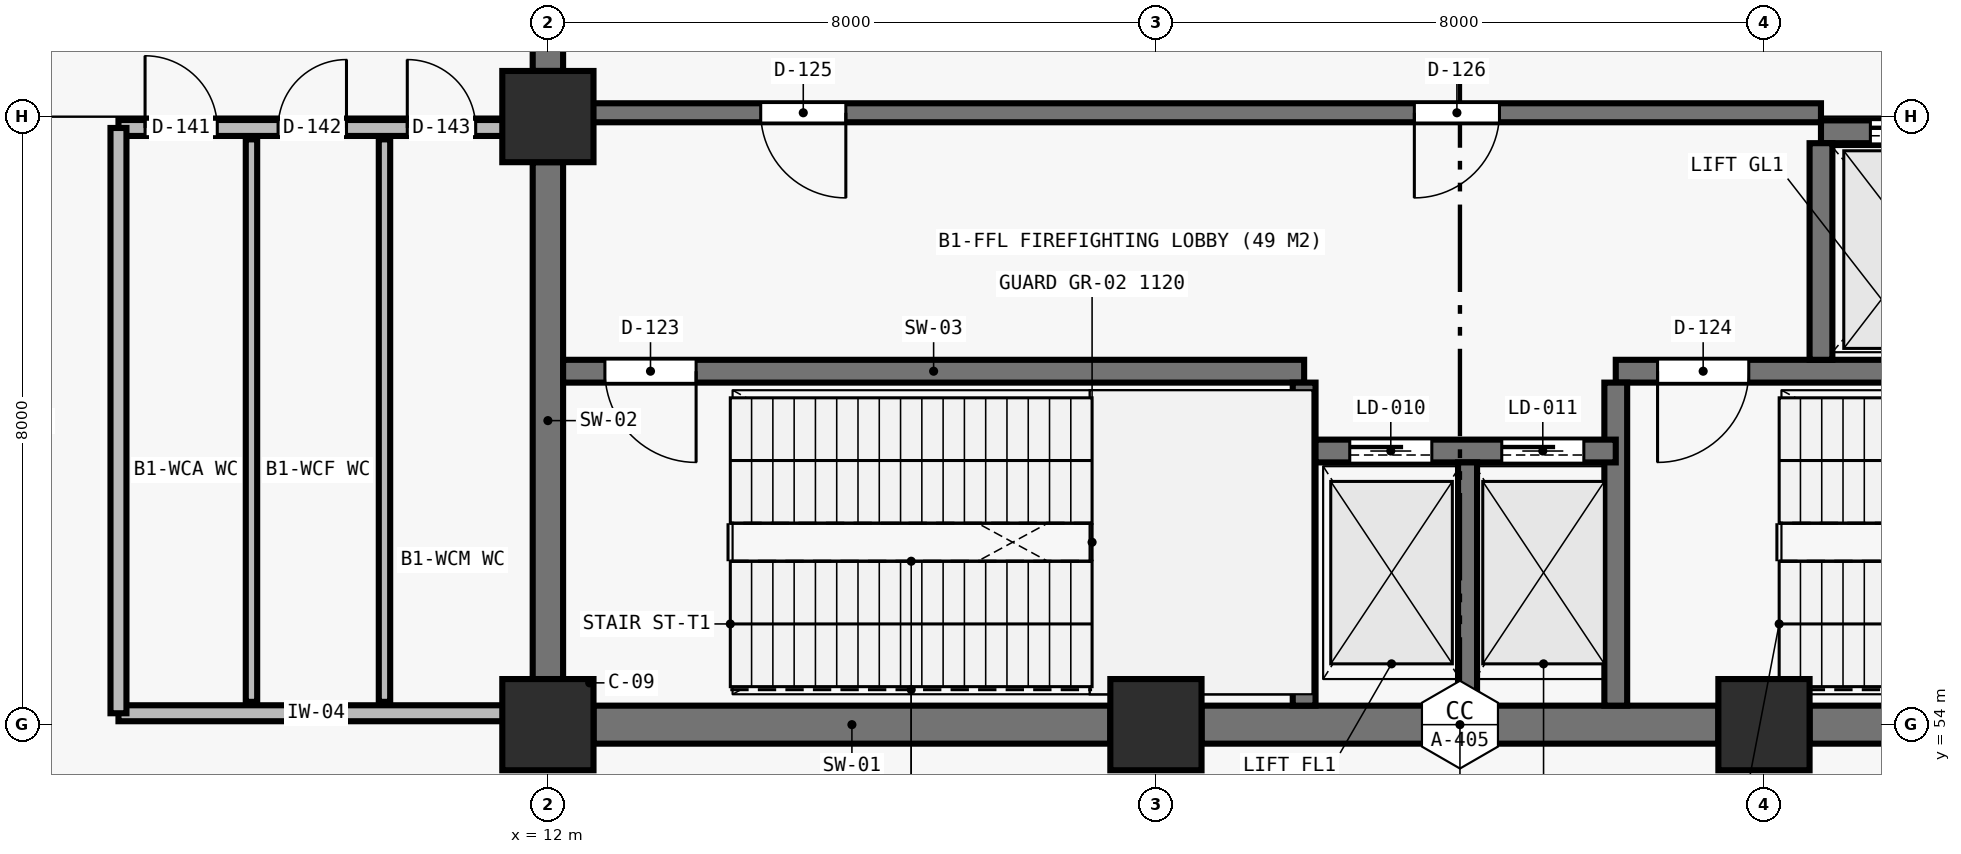
"""IFC4 building model, lengths in metres.
Left out: names, types, materials, properties, quantities, classifications, styles, units other than length and angle.
Written with IfcOpenShell. Run it as: python <this file> out.ifc"""

import sys

from ifc_helpers import new_model, si_unit, direction, frame, frame_2d, origin, origin_2d, place, context, subcontext, project, spatial, rectangle, extrude, element, fill, save


model = new_model("IFC4")
c1 = context("Model", 3, precision=1e-05, world=origin(), true_north=direction((0.0, 1.0)))
c2 = subcontext(c1, "Body", "Model", "MODEL_VIEW")
j1 = project(units=[si_unit("LENGTHUNIT", "METRE"), si_unit("PLANEANGLEUNIT", "RADIAN")], contexts=[c1])
p1 = place(None, origin())
s1 = spatial("IfcSite", under=j1, at=p1, CompositionType="ELEMENT")
p2 = place(p1, origin())
s2 = spatial("IfcBuilding", under=s1, at=p2, CompositionType="ELEMENT")
p3 = place(p2, frame((0.0, 0.0, -6.3)))
s3 = spatial("IfcBuildingStorey", under=s2, at=p3, CompositionType="ELEMENT", Elevation=-6.3)
for number, where, z_axis, x_axis in (
    (1, (12.0, 54.0, 0.0), (0.0, 0.0, 1.0), (1.0, 0.0, 0.0)),
    (2, (12.0, 62.0, 0.0), (0.0, 0.0, 1.0), (1.0, 0.0, 0.0)),
    (3, (20.0, 54.0, 0.0), (0.0, 0.0, 1.0), (1.0, 0.0, 0.0)),
    (4, (28.0, 54.0, 0.0), (0.0, 0.0, 1.0), (1.0, 0.0, 0.0)),
):
    element("IfcColumn", number, at=place(p3, frame(where, z_axis=z_axis, x_axis=x_axis)), inside=s3, PredefinedType="COLUMN", context=c2, shape_type="SweptSolid", body=[
        extrude(rectangle(XDim=1.2, YDim=1.2, at=origin_2d()), origin(), (0.0, 0.0, 1.0), 5.85),
    ])
for number, where, z_axis, x_axis in (
    (5, (12.6, 54.0, 0.0), (0.0, 0.0, 1.0), (1.0, 0.0, 0.0)),
    (6, (20.6, 54.0, 0.0), (0.0, 0.0, 1.0), (1.0, 0.0, 0.0)),
    (7, (28.6, 54.0, 0.0), (0.0, 0.0, 1.0), (1.0, 0.0, 0.0)),
):
    element("IfcWall", number, at=place(p3, frame(where, z_axis=z_axis, x_axis=x_axis)), inside=s3, PredefinedType="SHEAR", context=c2, shape_type="SweptSolid", body=[
        extrude(rectangle(XDim=6.8, YDim=0.5, at=frame_2d((3.4, 0.0))), origin(), (0.0, 0.0, 1.0), 5.85),
    ])
p4 = place(p3, frame((12.0, 54.6, 0.0), z_axis=(0.0, 0.0, 1.0), x_axis=(0.0, 1.0, 0.0)))
e8 = element("IfcWall", 8, at=p4, inside=s3, PredefinedType="SHEAR", context=c2, shape_type="SweptSolid", body=[
    extrude(rectangle(XDim=6.8, YDim=0.4, at=frame_2d((3.4, 0.0))), origin(), (0.0, 0.0, 1.0), 5.85),
])
p5 = place(p3, frame((12.0, 62.6, 0.0), z_axis=(0.0, 0.0, 1.0), x_axis=(0.0, 1.0, 0.0)))
e9 = element("IfcWall", 9, at=p5, inside=s3, PredefinedType="SHEAR", context=c2, shape_type="SweptSolid", body=[
    extrude(rectangle(XDim=6.8, YDim=0.4, at=frame_2d((3.4, 0.0))), origin(), (0.0, 0.0, 1.0), 5.85),
])
p6 = place(p5, frame((0.3, 0.0, 0.0)))
e10 = element("IfcOpeningElement", 10, at=p6, cuts=e9, PredefinedType="OPENING", context=c2, shape_type="SweptSolid", body=[
    extrude(rectangle(XDim=1.8, YDim=2.2, at=frame_2d((0.9, 1.1))), frame((0.0, 0.21, 0.0), z_axis=(0.0, -1.0, 0.0), x_axis=(1.0, 0.0, 0.0)), (0.0, 0.0, 1.0), 0.42),
])
p7 = place(p3, frame((12.2, 58.65, 0.0), z_axis=(0.0, 0.0, 1.0), x_axis=(1.0, 0.0, 0.0)))
e11 = element("IfcWall", 11, at=p7, inside=s3, PredefinedType="SHEAR", context=c2, shape_type="SweptSolid", body=[
    extrude(rectangle(XDim=9.75, YDim=0.3, at=frame_2d((4.875, 0.0))), origin(), (0.0, 0.0, 1.0), 5.85),
])
p8 = place(p7, frame((0.55, 0.0, 0.0)))
e12 = element("IfcOpeningElement", 12, at=p8, cuts=e11, PredefinedType="OPENING", context=c2, shape_type="SweptSolid", body=[
    extrude(rectangle(XDim=1.2, YDim=2.2, at=frame_2d((0.6, 1.1))), frame((0.0, 0.16, 0.0), z_axis=(0.0, -1.0, 0.0), x_axis=(1.0, 0.0, 0.0)), (0.0, 0.0, 1.0), 0.32),
])
p9 = place(p3, frame((21.95, 54.25, 0.0), z_axis=(0.0, 0.0, 1.0), x_axis=(0.0, 1.0, 0.0)))
e13 = element("IfcWall", 13, at=p9, inside=s3, PredefinedType="SHEAR", context=c2, shape_type="SweptSolid", body=[
    extrude(rectangle(XDim=4.25, YDim=0.3, at=frame_2d((2.125, 0.0))), origin(), (0.0, 0.0, 1.0), 5.85),
])
p10 = place(p3, frame((26.05, 58.65, 0.0), z_axis=(0.0, 0.0, 1.0), x_axis=(1.0, 0.0, 0.0)))
e14 = element("IfcWall", 14, at=p10, inside=s3, PredefinedType="SHEAR", context=c2, shape_type="SweptSolid", body=[
    extrude(rectangle(XDim=9.75, YDim=0.3, at=frame_2d((4.875, 0.0))), origin(), (0.0, 0.0, 1.0), 5.85),
])
p11 = place(p10, frame((0.55, 0.0, 0.0)))
e15 = element("IfcOpeningElement", 15, at=p11, cuts=e14, PredefinedType="OPENING", context=c2, shape_type="SweptSolid", body=[
    extrude(rectangle(XDim=1.2, YDim=2.2, at=frame_2d((0.6, 1.1))), frame((0.0, 0.16, 0.0), z_axis=(0.0, -1.0, 0.0), x_axis=(1.0, 0.0, 0.0)), (0.0, 0.0, 1.0), 0.32),
])
p12 = place(p3, frame((26.05, 54.25, 0.0), z_axis=(0.0, 0.0, 1.0), x_axis=(0.0, 1.0, 0.0)))
e16 = element("IfcWall", 16, at=p12, inside=s3, PredefinedType="SHEAR", context=c2, shape_type="SweptSolid", body=[
    extrude(rectangle(XDim=4.25, YDim=0.3, at=frame_2d((2.125, 0.0))), origin(), (0.0, 0.0, 1.0), 5.85),
])
p13 = place(p3, frame((22.1, 57.6, 0.0), z_axis=(0.0, 0.0, 1.0), x_axis=(1.0, 0.0, 0.0)))
e17 = element("IfcWall", 17, at=p13, inside=s3, PredefinedType="SHEAR", context=c2, shape_type="SweptSolid", body=[
    extrude(rectangle(XDim=3.95, YDim=0.3, at=frame_2d((1.975, 0.0))), origin(), (0.0, 0.0, 1.0), 5.85),
])
p14 = place(p13, frame((0.45, 0.0, 0.0)))
e18 = element("IfcOpeningElement", 18, at=p14, cuts=e17, PredefinedType="OPENING", context=c2, shape_type="SweptSolid", body=[
    extrude(rectangle(XDim=1.08, YDim=2.2, at=frame_2d((0.54, 1.1))), frame((0.0, 0.16, 0.0), z_axis=(0.0, -1.0, 0.0), x_axis=(1.0, 0.0, 0.0)), (0.0, 0.0, 1.0), 0.32),
])
p15 = place(p13, frame((2.45, 0.0, 0.0)))
e19 = element("IfcOpeningElement", 19, at=p15, cuts=e17, PredefinedType="OPENING", context=c2, shape_type="SweptSolid", body=[
    extrude(rectangle(XDim=1.08, YDim=2.2, at=frame_2d((0.54, 1.1))), frame((0.0, 0.16, 0.0), z_axis=(0.0, -1.0, 0.0), x_axis=(1.0, 0.0, 0.0)), (0.0, 0.0, 1.0), 0.32),
])
p16 = place(p3, frame((24.1, 54.25, 0.0), z_axis=(0.0, 0.0, 1.0), x_axis=(0.0, 1.0, 0.0)))
e20 = element("IfcWall", 20, at=p16, inside=s3, PredefinedType="SHEAR", context=c2, shape_type="SweptSolid", body=[
    extrude(rectangle(XDim=3.2, YDim=0.25, at=frame_2d((1.6, 0.0))), origin(), (0.0, 0.0, 1.0), 5.85),
])
p17 = place(p3, frame((28.75, 61.8, 0.0), z_axis=(0.0, 0.0, 1.0), x_axis=(1.0, 0.0, 0.0)))
e21 = element("IfcWall", 21, at=p17, inside=s3, PredefinedType="SHEAR", context=c2, shape_type="SweptSolid", body=[
    extrude(rectangle(XDim=5.0, YDim=0.3, at=frame_2d((2.5, 0.0))), origin(), (0.0, 0.0, 1.0), 5.85),
])
p18 = place(p17, frame((0.65, 0.0, 0.0)))
e22 = element("IfcOpeningElement", 22, at=p18, cuts=e21, PredefinedType="OPENING", context=c2, shape_type="SweptSolid", body=[
    extrude(rectangle(XDim=1.3, YDim=2.3, at=frame_2d((0.65, 1.15))), frame((0.0, 0.16, 0.0), z_axis=(0.0, -1.0, 0.0), x_axis=(1.0, 0.0, 0.0)), (0.0, 0.0, 1.0), 0.32),
])
p19 = place(p17, frame((3.1, 0.0, 0.0)))
e23 = element("IfcOpeningElement", 23, at=p19, cuts=e21, PredefinedType="OPENING", context=c2, shape_type="SweptSolid", body=[
    extrude(rectangle(XDim=1.08, YDim=2.2, at=frame_2d((0.54, 1.1))), frame((0.0, 0.16, 0.0), z_axis=(0.0, -1.0, 0.0), x_axis=(1.0, 0.0, 0.0)), (0.0, 0.0, 1.0), 0.32),
])
p20 = place(p3, frame((28.75, 58.8, 0.0), z_axis=(0.0, 0.0, 1.0), x_axis=(0.0, 1.0, 0.0)))
e24 = element("IfcWall", 24, at=p20, inside=s3, PredefinedType="SHEAR", context=c2, shape_type="SweptSolid", body=[
    extrude(rectangle(XDim=2.85, YDim=0.3, at=frame_2d((1.425, 0.0))), origin(), (0.0, 0.0, 1.0), 5.85),
])
p21 = place(p3, frame((12.2, 62.05, 0.0), z_axis=(0.0, 0.0, 1.0), x_axis=(1.0, 0.0, 0.0)))
e25 = element("IfcWall", 25, at=p21, inside=s3, PredefinedType="SHEAR", context=c2, shape_type="SweptSolid", body=[
    extrude(rectangle(XDim=16.55, YDim=0.25, at=frame_2d((8.275, 0.0))), origin(), (0.0, 0.0, 1.0), 5.85),
])
p22 = place(p21, frame((2.6, 0.0, 0.0)))
e26 = element("IfcOpeningElement", 26, at=p22, cuts=e25, PredefinedType="OPENING", context=c2, shape_type="SweptSolid", body=[
    extrude(rectangle(XDim=1.12, YDim=2.22, at=frame_2d((0.56, 1.11))), frame((0.0, 0.135, 0.0), z_axis=(0.0, -1.0, 0.0), x_axis=(1.0, 0.0, 0.0)), (0.0, 0.0, 1.0), 0.27),
])
p23 = place(p21, frame((11.2, 0.0, 0.0)))
e27 = element("IfcOpeningElement", 27, at=p23, cuts=e25, PredefinedType="OPENING", context=c2, shape_type="SweptSolid", body=[
    extrude(rectangle(XDim=1.12, YDim=2.22, at=frame_2d((0.56, 1.11))), frame((0.0, 0.135, 0.0), z_axis=(0.0, -1.0, 0.0), x_axis=(1.0, 0.0, 0.0)), (0.0, 0.0, 1.0), 0.27),
])
p24 = place(p3, frame((6.35, 61.85, 0.0), z_axis=(0.0, 0.0, 1.0), x_axis=(1.0, 0.0, 0.0)))
e28 = element("IfcWall", 28, at=p24, inside=s3, PredefinedType="PLUMBINGWALL", context=c2, shape_type="SweptSolid", body=[
    extrude(rectangle(XDim=5.2, YDim=0.21, at=frame_2d((2.6, 0.0))), origin(), (0.0, 0.0, 1.0), 4.65),
])
p25 = place(p24, frame((0.35, 0.0, 0.0)))
e29 = element("IfcOpeningElement", 29, at=p25, cuts=e28, PredefinedType="OPENING", context=c2, shape_type="SweptSolid", body=[
    extrude(rectangle(XDim=0.95, YDim=2.1, at=frame_2d((0.475, 1.05))), frame((0.0, 0.115, 0.0), z_axis=(0.0, -1.0, 0.0), x_axis=(1.0, 0.0, 0.0)), (0.0, 0.0, 1.0), 0.23),
])
p26 = place(p24, frame((2.1, 0.0, 0.0)))
e30 = element("IfcOpeningElement", 30, at=p26, cuts=e28, PredefinedType="OPENING", context=c2, shape_type="SweptSolid", body=[
    extrude(rectangle(XDim=0.9, YDim=2.1, at=frame_2d((0.45, 1.05))), frame((0.0, 0.115, 0.0), z_axis=(0.0, -1.0, 0.0), x_axis=(1.0, 0.0, 0.0)), (0.0, 0.0, 1.0), 0.23),
])
p27 = place(p24, frame((3.8, 0.0, 0.0)))
e31 = element("IfcOpeningElement", 31, at=p27, cuts=e28, PredefinedType="OPENING", context=c2, shape_type="SweptSolid", body=[
    extrude(rectangle(XDim=0.9, YDim=2.1, at=frame_2d((0.45, 1.05))), frame((0.0, 0.115, 0.0), z_axis=(0.0, -1.0, 0.0), x_axis=(1.0, 0.0, 0.0)), (0.0, 0.0, 1.0), 0.23),
])
p28 = place(p3, frame((6.35, 54.15, 0.0), z_axis=(0.0, 0.0, 1.0), x_axis=(1.0, 0.0, 0.0)))
e32 = element("IfcWall", 32, at=p28, inside=s3, PredefinedType="PLUMBINGWALL", context=c2, shape_type="SweptSolid", body=[
    extrude(rectangle(XDim=5.2, YDim=0.21, at=frame_2d((2.6, 0.0))), origin(), (0.0, 0.0, 1.0), 4.65),
])
p29 = place(p3, frame((6.35, 54.15, 0.0), z_axis=(0.0, 0.0, 1.0), x_axis=(0.0, 1.0, 0.0)))
e33 = element("IfcWall", 33, at=p29, inside=s3, PredefinedType="PLUMBINGWALL", context=c2, shape_type="SweptSolid", body=[
    extrude(rectangle(XDim=7.7, YDim=0.21, at=frame_2d((3.85, 0.0))), origin(), (0.0, 0.0, 1.0), 5.85),
])
for number, where, z_axis, x_axis in (
    (34, (8.1, 54.3, 0.0), (0.0, 0.0, 1.0), (0.0, 1.0, 0.0)),
    (35, (9.85, 54.3, 0.0), (0.0, 0.0, 1.0), (0.0, 1.0, 0.0)),
):
    element("IfcWall", number, at=place(p3, frame(where, z_axis=z_axis, x_axis=x_axis)), inside=s3, PredefinedType="PARTITIONING", context=c2, shape_type="SweptSolid", body=[
        extrude(rectangle(XDim=7.4, YDim=0.15, at=frame_2d((3.7, 0.0))), origin(), (0.0, 0.0, 1.0), 5.85),
    ])
p30 = place(p8, frame((1.2, 0.0, 0.0), z_axis=(0.0, 0.0, 1.0), x_axis=(-1.0, 0.0, 0.0)))
e36 = element("IfcDoor", 36, at=p30, inside=s3, OperationType="SINGLE_SWING_LEFT", PredefinedType="DOOR", context=c2, shape_type="SweptSolid", body=[
    extrude(rectangle(XDim=1.2, YDim=2.2, at=frame_2d((0.6, 1.1))), frame((0.0, 0.025, 0.0), z_axis=(0.0, -1.0, 0.0), x_axis=(1.0, 0.0, 0.0)), (0.0, 0.0, 1.0), 0.05),
])
fill(e12, e36)
p31 = place(p11, frame((1.2, 0.0, 0.0), z_axis=(0.0, 0.0, 1.0), x_axis=(-1.0, 0.0, 0.0)))
e37 = element("IfcDoor", 37, at=p31, inside=s3, OperationType="SINGLE_SWING_RIGHT", PredefinedType="DOOR", context=c2, shape_type="SweptSolid", body=[
    extrude(rectangle(XDim=1.2, YDim=2.2, at=frame_2d((0.6, 1.1))), frame((0.0, 0.025, 0.0), z_axis=(0.0, -1.0, 0.0), x_axis=(1.0, 0.0, 0.0)), (0.0, 0.0, 1.0), 0.05),
])
fill(e15, e37)
p32 = place(p14, origin())
e38 = element("IfcDoor", 38, at=p32, inside=s3, OperationType="SLIDING_TO_LEFT", PredefinedType="DOOR", context=c2, shape_type="SweptSolid", body=[
    extrude(rectangle(XDim=1.08, YDim=2.2, at=frame_2d((0.54, 1.1))), frame((0.0, 0.025, 0.0), z_axis=(0.0, -1.0, 0.0), x_axis=(1.0, 0.0, 0.0)), (0.0, 0.0, 1.0), 0.05),
])
fill(e18, e38)
p33 = place(p15, origin())
e39 = element("IfcDoor", 39, at=p33, inside=s3, OperationType="SLIDING_TO_LEFT", PredefinedType="DOOR", context=c2, shape_type="SweptSolid", body=[
    extrude(rectangle(XDim=1.08, YDim=2.2, at=frame_2d((0.54, 1.1))), frame((0.0, 0.025, 0.0), z_axis=(0.0, -1.0, 0.0), x_axis=(1.0, 0.0, 0.0)), (0.0, 0.0, 1.0), 0.05),
])
fill(e19, e39)
p34 = place(p18, origin())
e40 = element("IfcDoor", 40, at=p34, inside=s3, OperationType="SLIDING_TO_LEFT", PredefinedType="DOOR", context=c2, shape_type="SweptSolid", body=[
    extrude(rectangle(XDim=1.3, YDim=2.3, at=frame_2d((0.65, 1.15))), frame((0.0, 0.025, 0.0), z_axis=(0.0, -1.0, 0.0), x_axis=(1.0, 0.0, 0.0)), (0.0, 0.0, 1.0), 0.05),
])
fill(e22, e40)
p35 = place(p22, frame((1.12, 0.0, 0.0), z_axis=(0.0, 0.0, 1.0), x_axis=(-1.0, 0.0, 0.0)))
e41 = element("IfcDoor", 41, at=p35, inside=s3, OperationType="SINGLE_SWING_LEFT", PredefinedType="DOOR", context=c2, shape_type="SweptSolid", body=[
    extrude(rectangle(XDim=1.12, YDim=2.22, at=frame_2d((0.56, 1.11))), frame((0.0, 0.025, 0.0), z_axis=(0.0, -1.0, 0.0), x_axis=(1.0, 0.0, 0.0)), (0.0, 0.0, 1.0), 0.05),
])
fill(e26, e41)
p36 = place(p23, frame((1.12, 0.0, 0.0), z_axis=(0.0, 0.0, 1.0), x_axis=(-1.0, 0.0, 0.0)))
e42 = element("IfcDoor", 42, at=p36, inside=s3, OperationType="SINGLE_SWING_RIGHT", PredefinedType="DOOR", context=c2, shape_type="SweptSolid", body=[
    extrude(rectangle(XDim=1.12, YDim=2.22, at=frame_2d((0.56, 1.11))), frame((0.0, 0.025, 0.0), z_axis=(0.0, -1.0, 0.0), x_axis=(1.0, 0.0, 0.0)), (0.0, 0.0, 1.0), 0.05),
])
fill(e27, e42)
p37 = place(p25, origin())
e43 = element("IfcDoor", 43, at=p37, inside=s3, OperationType="SINGLE_SWING_LEFT", PredefinedType="DOOR", context=c2, shape_type="SweptSolid", body=[
    extrude(rectangle(XDim=0.95, YDim=2.1, at=frame_2d((0.475, 1.05))), frame((0.0, 0.025, 0.0), z_axis=(0.0, -1.0, 0.0), x_axis=(1.0, 0.0, 0.0)), (0.0, 0.0, 1.0), 0.05),
])
fill(e29, e43)
p38 = place(p26, origin())
e44 = element("IfcDoor", 44, at=p38, inside=s3, OperationType="SINGLE_SWING_RIGHT", PredefinedType="DOOR", context=c2, shape_type="SweptSolid", body=[
    extrude(rectangle(XDim=0.9, YDim=2.1, at=frame_2d((0.45, 1.05))), frame((0.0, 0.025, 0.0), z_axis=(0.0, -1.0, 0.0), x_axis=(1.0, 0.0, 0.0)), (0.0, 0.0, 1.0), 0.05),
])
fill(e30, e44)
p39 = place(p27, origin())
e45 = element("IfcDoor", 45, at=p39, inside=s3, OperationType="SINGLE_SWING_LEFT", PredefinedType="DOOR", context=c2, shape_type="SweptSolid", body=[
    extrude(rectangle(XDim=0.9, YDim=2.1, at=frame_2d((0.45, 1.05))), frame((0.0, 0.025, 0.0), z_axis=(0.0, -1.0, 0.0), x_axis=(1.0, 0.0, 0.0)), (0.0, 0.0, 1.0), 0.05),
])
fill(e31, e45)
save(model, sys.argv[1])
